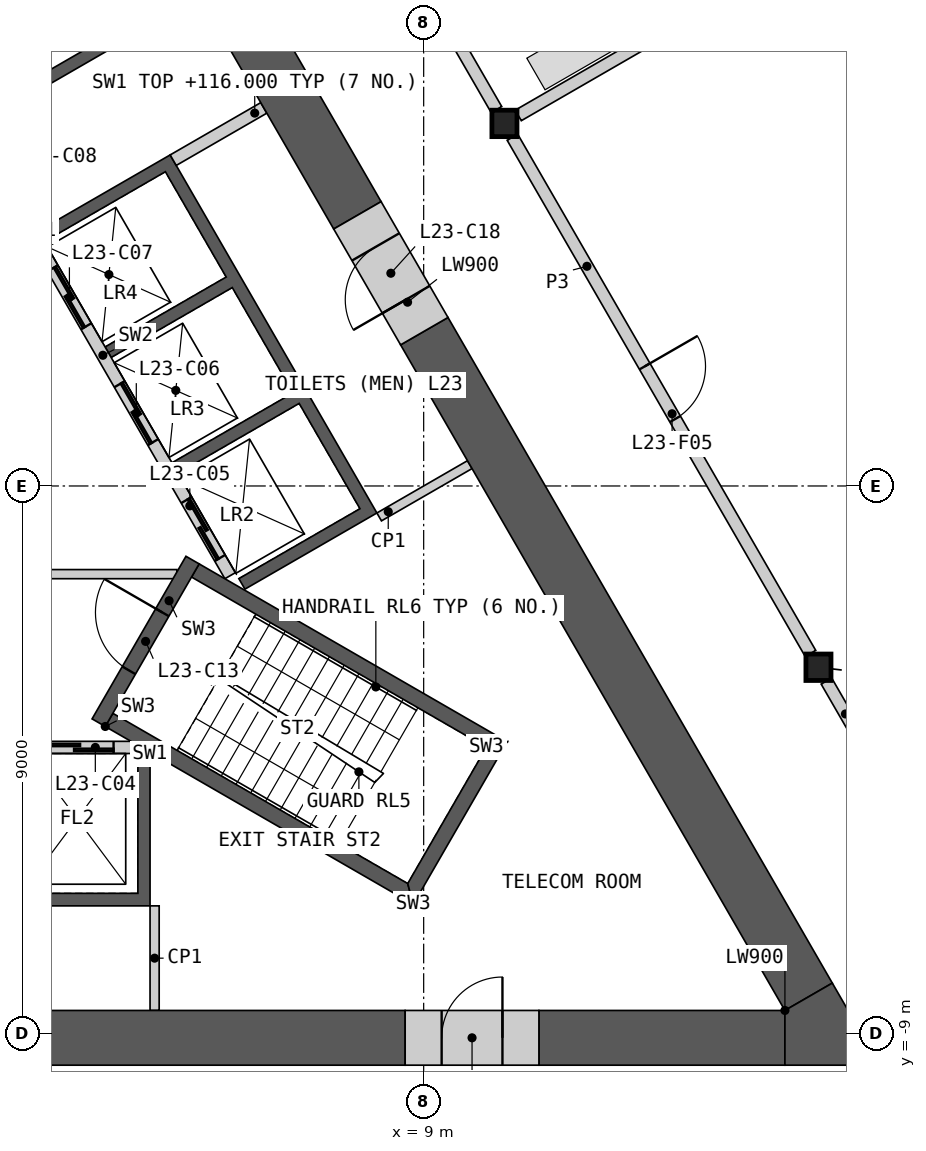
"""IFC4 building model, lengths in metres.
Left out: names, types, materials, properties, quantities, classifications, styles, units other than length and angle.
Written with IfcOpenShell. Run it as: python <this file> out.ifc"""

import sys

from ifc_helpers import new_model, si_unit, direction, frame, frame_2d, origin, origin_2d, place, context, subcontext, project, spatial, polyline, rectangle, i_section, outline, extrude, element, fill, save


model = new_model("IFC4")
c1 = context("Model", 3, precision=1e-05, world=origin(), true_north=direction((0.0, 1.0)))
c2 = subcontext(c1, "Body", "Model", "MODEL_VIEW")
j1 = project(units=[si_unit("LENGTHUNIT", "METRE"), si_unit("PLANEANGLEUNIT", "RADIAN")], contexts=[c1])
p1 = place(None, origin())
s1 = spatial("IfcSite", under=j1, at=p1, CompositionType="ELEMENT")
p2 = place(p1, origin())
s2 = spatial("IfcBuilding", under=s1, at=p2, CompositionType="ELEMENT")
p3 = place(p2, frame((0.0, 0.0, 112.2)))
s3 = spatial("IfcBuildingStorey", under=s2, at=p3, CompositionType="ELEMENT", Elevation=112.2)
for number, where, z_axis, x_axis in (
    (1, (15.493, -2.982, 0.0), (0.0, 0.0, 1.0), (1.0, 0.0, 0.0)),
    (2, (10.328, 5.963, 0.0), (0.0, 0.0, 1.0), (1.0, 0.0, 0.0)),
):
    element("IfcColumn", number, at=place(p3, frame(where, z_axis=z_axis, x_axis=x_axis)), inside=s3, PredefinedType="COLUMN", context=c2, shape_type="SweptSolid", body=[
        extrude(i_section(OverallWidth=0.412, OverallDepth=0.435, WebThickness=0.036, FlangeThickness=0.057, at=origin_2d()), origin(), (0.0, 0.0, 1.0), 4.2),
    ])
p4 = place(p3, origin())
e3 = element("IfcWall", 3, at=p4, inside=s3, PredefinedType="SHEAR", context=c2, shape_type="SweptSolid", body=[
    extrude(outline(polyline([(4.5, -4.4), (4.5, -6.906), (-4.5, -6.906), (-4.5, -4.4), (-4.3, -4.4), (-4.3, -6.7), (-2.3, -6.7), (-2.3, -4.4), (-2.1, -4.4), (-2.1, -6.7), (-0.1, -6.7), (-0.1, -4.4), (0.1, -4.4), (0.1, -6.7), (2.1, -6.7), (2.1, -4.4), (2.3, -4.4), (2.3, -6.7), (4.3, -6.7), (4.3, -4.4), (4.5, -4.4)])), origin(), (0.0, 0.0, 1.0), 3.8),
])
p5 = place(p3, frame((-4.187, -4.3, 0.0), z_axis=(0.0, 0.0, 1.0), x_axis=(1.0, 0.0, 0.0)))
e4 = element("IfcWall", 4, at=p5, inside=s3, PredefinedType="SOLIDWALL", context=c2, shape_type="SweptSolid", body=[
    extrude(rectangle(XDim=8.373, YDim=0.2, at=frame_2d((4.187, 0.0))), origin(), (0.0, 0.0, 1.0), 3.8),
])
p6 = place(p5, frame((0.287, 0.0, 0.0)))
e5 = element("IfcOpeningElement", 5, at=p6, cuts=e4, PredefinedType="OPENING", context=c2, shape_type="SweptSolid", body=[
    extrude(rectangle(XDim=1.2, YDim=2.1, at=frame_2d((0.6, 1.05))), frame((0.0, 0.11, 0.0), z_axis=(0.0, -1.0, 0.0), x_axis=(1.0, 0.0, 0.0)), (0.0, 0.0, 1.0), 0.22),
])
p7 = place(p5, frame((2.387, 0.0, 0.0)))
e6 = element("IfcOpeningElement", 6, at=p7, cuts=e4, PredefinedType="OPENING", context=c2, shape_type="SweptSolid", body=[
    extrude(rectangle(XDim=1.4, YDim=2.1, at=frame_2d((0.7, 1.05))), frame((0.0, 0.11, 0.0), z_axis=(0.0, -1.0, 0.0), x_axis=(1.0, 0.0, 0.0)), (0.0, 0.0, 1.0), 0.22),
])
p8 = place(p5, frame((4.737, 0.0, 0.0)))
e7 = element("IfcOpeningElement", 7, at=p8, cuts=e4, PredefinedType="OPENING", context=c2, shape_type="SweptSolid", body=[
    extrude(rectangle(XDim=1.1, YDim=2.1, at=frame_2d((0.55, 1.05))), frame((0.0, 0.11, 0.0), z_axis=(0.0, -1.0, 0.0), x_axis=(1.0, 0.0, 0.0)), (0.0, 0.0, 1.0), 0.22),
])
p9 = place(p5, frame((6.887, 0.0, 0.0)))
e8 = element("IfcOpeningElement", 8, at=p9, cuts=e4, PredefinedType="OPENING", context=c2, shape_type="SweptSolid", body=[
    extrude(rectangle(XDim=1.2, YDim=2.1, at=frame_2d((0.6, 1.05))), frame((0.0, 0.11, 0.0), z_axis=(0.0, -1.0, 0.0), x_axis=(1.0, 0.0, 0.0)), (0.0, 0.0, 1.0), 0.22),
])
p10 = place(p3, origin())
e9 = element("IfcWall", 9, at=p10, inside=s3, PredefinedType="SHEAR", context=c2, shape_type="SweptSolid", body=[
    extrude(outline(polyline([(1.561, 6.097), (3.731, 7.35), (3.831, 7.177), (1.66, 5.924), (1.561, 6.097)])), origin(), (0.0, 0.0, 1.0), 3.8),
])
p11 = place(p3, origin())
e10 = element("IfcWall", 10, at=p11, inside=s3, PredefinedType="SHEAR", context=c2, shape_type="SweptSolid", body=[
    extrude(outline(polyline([(2.66, 4.192), (4.831, 5.445), (8.231, -0.444), (6.061, -1.697), (5.96, -1.524), (7.952, -0.374), (6.952, 1.358), (4.96, 0.208), (4.861, 0.381), (6.852, 1.531), (5.852, 3.263), (3.861, 2.113), (3.76, 2.287), (5.752, 3.437), (4.752, 5.169), (2.76, 4.019), (2.66, 4.192)])), origin(), (0.0, 0.0, 1.0), 3.8),
])
p12 = place(p3, frame((5.817, -1.476, 0.0), z_axis=(0.0, 0.0, 1.0), x_axis=(-0.500002616675, 0.866023893041, 0.0)))
e11 = element("IfcWall", 11, at=p12, inside=s3, PredefinedType="SOLIDWALL", context=c2, shape_type="SweptSolid", body=[
    extrude(rectangle(XDim=8.373, YDim=0.2, at=frame_2d((4.187, 0.0))), origin(), (0.0, 0.0, 1.0), 3.8),
])
p13 = place(p12, frame((0.337, 0.0, 0.0)))
e12 = element("IfcOpeningElement", 12, at=p13, cuts=e11, PredefinedType="OPENING", context=c2, shape_type="SweptSolid", body=[
    extrude(rectangle(XDim=1.1, YDim=2.1, at=frame_2d((0.55, 1.05))), frame((0.0, 0.11, 0.0), z_axis=(0.0, -1.0, 0.0), x_axis=(1.0, 0.0, 0.0)), (0.0, 0.0, 1.0), 0.22),
])
p14 = place(p12, frame((2.537, 0.0, 0.0)))
e13 = element("IfcOpeningElement", 13, at=p14, cuts=e11, PredefinedType="OPENING", context=c2, shape_type="SweptSolid", body=[
    extrude(rectangle(XDim=1.1, YDim=2.1, at=frame_2d((0.55, 1.05))), frame((0.0, 0.11, 0.0), z_axis=(0.0, -1.0, 0.0), x_axis=(1.0, 0.0, 0.0)), (0.0, 0.0, 1.0), 0.22),
])
p15 = place(p12, frame((4.737, 0.0, 0.0)))
e14 = element("IfcOpeningElement", 14, at=p15, cuts=e11, PredefinedType="OPENING", context=c2, shape_type="SweptSolid", body=[
    extrude(rectangle(XDim=1.1, YDim=2.1, at=frame_2d((0.55, 1.05))), frame((0.0, 0.11, 0.0), z_axis=(0.0, -1.0, 0.0), x_axis=(1.0, 0.0, 0.0)), (0.0, 0.0, 1.0), 0.22),
])
p16 = place(p12, frame((7.037, 0.0, 0.0)))
e15 = element("IfcOpeningElement", 15, at=p16, cuts=e11, PredefinedType="OPENING", context=c2, shape_type="SweptSolid", body=[
    extrude(rectangle(XDim=0.9, YDim=2.1, at=frame_2d((0.45, 1.05))), frame((0.0, 0.11, 0.0), z_axis=(0.0, -1.0, 0.0), x_axis=(1.0, 0.0, 0.0)), (0.0, 0.0, 1.0), 0.22),
])
p17 = place(p3, frame((4.881, 5.358, 0.0), z_axis=(0.0, 0.0, 1.0), x_axis=(0.866024871741, 0.500000921525, 0.0)))
e16 = element("IfcWall", 16, at=p17, inside=s3, PredefinedType="SHEAR", context=c2, shape_type="SweptSolid", body=[
    extrude(rectangle(XDim=1.72, YDim=0.2, at=frame_2d((0.86, 0.0))), origin(), (0.0, 0.0, 1.0), 3.8),
])
p18 = place(p3, frame((-4.941, -1.45, 0.0), z_axis=(0.0, 0.0, 1.0), x_axis=(1.0, 0.0, 0.0)))
e17 = element("IfcWall", 17, at=p18, inside=s3, PredefinedType="PARTITIONING", context=c2, shape_type="SweptSolid", body=[
    extrude(rectangle(XDim=9.882, YDim=0.15, at=frame_2d((4.941, 0.0))), origin(), (0.0, 0.0, 1.0), 3.8),
])
p19 = place(p18, frame((4.391, 0.0, 0.0)))
e18 = element("IfcOpeningElement", 18, at=p19, cuts=e17, PredefinedType="OPENING", context=c2, shape_type="SweptSolid", body=[
    extrude(rectangle(XDim=1.1, YDim=2.1, at=frame_2d((0.55, 1.05))), frame((0.0, 0.085, 0.0), z_axis=(0.0, -1.0, 0.0), x_axis=(1.0, 0.0, 0.0)), (0.0, 0.0, 1.0), 0.17),
])
p20 = place(p3, origin())
e19 = element("IfcWall", 19, at=p20, inside=s3, PredefinedType="SHEAR", context=c2, shape_type="SweptSolid", body=[
    extrude(outline(polyline([(3.763, -3.956), (8.83, -6.881), (8.738, -6.539), (3.888, -3.739), (3.763, -3.956)])), origin(), (0.0, 0.0, 1.0), 3.8),
])
p21 = place(p3, origin())
e20 = element("IfcWall", 20, at=p21, inside=s3, PredefinedType="SHEAR", context=c2, shape_type="SweptSolid", body=[
    extrude(outline(polyline([(8.83, -6.881), (10.374, -4.206), (10.032, -4.298), (8.738, -6.539), (8.83, -6.881)])), origin(), (0.0, 0.0, 1.0), 3.8),
])
p22 = place(p3, origin())
e21 = element("IfcWall", 21, at=p22, inside=s3, PredefinedType="SHEAR", context=c2, shape_type="SweptSolid", body=[
    extrude(outline(polyline([(10.032, -4.298), (10.374, -4.206), (5.307, -1.281), (5.182, -1.498), (10.032, -4.298)])), origin(), (0.0, 0.0, 1.0), 3.8),
])
p23 = place(p3, frame((3.655, -3.893, 0.0), z_axis=(0.0, 0.0, 1.0), x_axis=(0.499982516597, 0.866035497597, 0.0)))
e22 = element("IfcWall", 22, at=p23, inside=s3, PredefinedType="SHEAR", context=c2, shape_type="SweptSolid", body=[
    extrude(rectangle(XDim=3.088, YDim=0.25, at=frame_2d((1.544, 0.0))), origin(), (0.0, 0.0, 1.0), 3.8),
])
p24 = place(p23, frame((0.994, 0.0, 0.0)))
e23 = element("IfcOpeningElement", 23, at=p24, cuts=e22, PredefinedType="OPENING", context=c2, shape_type="SweptSolid", body=[
    extrude(rectangle(XDim=1.1, YDim=2.1, at=frame_2d((0.55, 1.05))), frame((0.0, 0.135, 0.0), z_axis=(0.0, -1.0, 0.0), x_axis=(1.0, 0.0, 0.0)), (0.0, 0.0, 1.0), 0.27),
])
for number, where, z_axis, x_axis in (
    (24, (4.575, -6.906, 0.0), (0.0, 0.0, 1.0), (0.0, -1.0, 0.0)),
    (25, (8.268, -0.509, 0.0), (0.0, 0.0, 1.0), (0.866, 0.5, 0.0)),
):
    element("IfcWall", number, at=place(p3, frame(where, z_axis=z_axis, x_axis=x_axis)), inside=s3, PredefinedType="PARTITIONING", context=c2, shape_type="SweptSolid", body=[
        extrude(rectangle(XDim=1.72, YDim=0.15, at=frame_2d((0.86, 0.0))), origin(), (0.0, 0.0, 1.0), 3.8),
    ])
p25 = place(p3, frame((1.1, -9.076, 0.0), z_axis=(0.0, 0.0, 1.0), x_axis=(1.0, 0.0, 0.0)))
e26 = element("IfcWall", 26, at=p25, inside=s3, PredefinedType="SHEAR", context=c2, shape_type="SweptSolid", body=[
    extrude(rectangle(XDim=7.595, YDim=0.9, at=frame_2d((3.798, 0.0))), origin(), (0.0, 0.0, 1.0), 3.8),
])
p26 = place(p3, frame((10.896, -9.076, 0.0), z_axis=(0.0, 0.0, 1.0), x_axis=(1.0, 0.0, 0.0)))
e27 = element("IfcWall", 27, at=p26, inside=s3, PredefinedType="SHEAR", context=c2, shape_type="SweptSolid", body=[
    extrude(rectangle(XDim=4.046, YDim=0.9, at=frame_2d((2.023, 0.0))), origin(), (0.0, 0.0, 1.0), 3.8),
])
p27 = place(p3, frame((7.91, 4.451, 0.0), z_axis=(0.0, 0.0, 1.0), x_axis=(-0.500005799286, 0.866022055539, 0.0)))
e28 = element("IfcWall", 28, at=p27, inside=s3, PredefinedType="SHEAR", context=c2, shape_type="SweptSolid", body=[
    extrude(rectangle(XDim=15.041, YDim=0.9, at=frame_2d((7.521, 0.0))), origin(), (0.0, 0.0, 1.0), 3.8),
])
p28 = place(p3, frame((15.331, -8.401, 0.0), z_axis=(0.0, 0.0, 1.0), x_axis=(-0.49999216708, 0.866029926076, 0.0)))
e29 = element("IfcWall", 29, at=p28, inside=s3, PredefinedType="SHEAR", context=c2, shape_type="SweptSolid", body=[
    extrude(rectangle(XDim=12.641, YDim=0.9, at=frame_2d((6.321, 0.0))), origin(), (0.0, 0.0, 1.0), 3.8),
])
p29 = place(p3, origin())
e30 = element("IfcWall", 30, at=p29, inside=s3, PredefinedType="SHEAR", context=c2, shape_type="SweptSolid", body=[
    extrude(outline(polyline([(14.941, -8.626), (15.721, -8.176), (16.5, -9.526), (14.941, -9.526), (14.941, -8.626)])), origin(), (0.0, 0.0, 1.0), 3.8),
])
p30 = place(p3, frame((8.696, -9.076, 0.0), z_axis=(0.0, 0.0, 1.0), x_axis=(1.0, 0.0, 0.0)))
e31 = element("IfcWall", 31, at=p30, inside=s3, PredefinedType="SHEAR", context=c2, shape_type="SweptSolid", body=[
    extrude(rectangle(XDim=2.2, YDim=0.9, at=frame_2d((1.1, 0.0))), origin(), (0.0, 0.0, 1.0), 3.8),
])
p31 = place(p30, frame((0.6, 0.0, 0.0)))
e32 = element("IfcOpeningElement", 32, at=p31, cuts=e31, PredefinedType="OPENING", context=c2, shape_type="SweptSolid", body=[
    extrude(rectangle(XDim=1.0, YDim=2.1, at=frame_2d((0.5, 1.05))), frame((0.0, 0.46, 0.0), z_axis=(0.0, -1.0, 0.0), x_axis=(1.0, 0.0, 0.0)), (0.0, 0.0, 1.0), 0.92),
])
p32 = place(p3, frame((9.01, 2.546, 0.0), z_axis=(0.0, 0.0, 1.0), x_axis=(-0.499994660107, 0.866028486751, 0.0)))
e33 = element("IfcWall", 33, at=p32, inside=s3, PredefinedType="SHEAR", context=c2, shape_type="SweptSolid", body=[
    extrude(rectangle(XDim=2.2, YDim=0.9, at=frame_2d((1.1, 0.0))), origin(), (0.0, 0.0, 1.0), 3.8),
])
p33 = place(p32, frame((0.6, 0.0, 0.0)))
e34 = element("IfcOpeningElement", 34, at=p33, cuts=e33, PredefinedType="OPENING", context=c2, shape_type="SweptSolid", body=[
    extrude(rectangle(XDim=1.0, YDim=2.1, at=frame_2d((0.5, 1.05))), frame((0.0, 0.46, 0.0), z_axis=(0.0, -1.0, 0.0), x_axis=(1.0, 0.0, 0.0)), (0.0, 0.0, 1.0), 0.92),
])
p34 = place(p3, frame((10.46, 5.736, 0.0), z_axis=(0.0, 0.0, 1.0), x_axis=(0.500004141693, -0.866023012564, 0.0)))
e35 = element("IfcWall", 35, at=p34, inside=s3, PredefinedType="PARTITIONING", context=c2, shape_type="SweptSolid", body=[
    extrude(rectangle(XDim=9.803, YDim=0.2, at=frame_2d((4.902, 0.0))), origin(), (0.0, 0.0, 1.0), 3.8),
])
p35 = place(p34, frame((4.352, 0.0, 0.0)))
e36 = element("IfcOpeningElement", 36, at=p35, cuts=e35, PredefinedType="OPENING", context=c2, shape_type="SweptSolid", body=[
    extrude(rectangle(XDim=1.0, YDim=2.1, at=frame_2d((0.5, 1.05))), frame((0.0, 0.11, 0.0), z_axis=(0.0, -1.0, 0.0), x_axis=(1.0, 0.0, 0.0)), (0.0, 0.0, 1.0), 0.22),
])
p36 = place(p3, frame((5.295, 14.68, 0.0), z_axis=(0.0, 0.0, 1.0), x_axis=(0.500012035596, -0.866018454918, 0.0)))
e37 = element("IfcWall", 37, at=p36, inside=s3, PredefinedType="PARTITIONING", context=c2, shape_type="SweptSolid", body=[
    extrude(rectangle(XDim=9.803, YDim=0.2, at=frame_2d((4.902, 0.0))), origin(), (0.0, 0.0, 1.0), 3.8),
])
p37 = place(p36, frame((4.376, 0.0, 0.0)))
e38 = element("IfcOpeningElement", 38, at=p37, cuts=e37, PredefinedType="OPENING", context=c2, shape_type="SweptSolid", body=[
    extrude(rectangle(XDim=0.95, YDim=2.1, at=frame_2d((0.475, 1.05))), frame((0.0, 0.11, 0.0), z_axis=(0.0, -1.0, 0.0), x_axis=(1.0, 0.0, 0.0)), (0.0, 0.0, 1.0), 0.22),
])
p38 = place(p3, frame((15.624, -3.209, 0.0), z_axis=(0.0, 0.0, 1.0), x_axis=(0.499997920671, -0.866026604282, 0.0)))
e39 = element("IfcWall", 39, at=p38, inside=s3, PredefinedType="PARTITIONING", context=c2, shape_type="SweptSolid", body=[
    extrude(rectangle(XDim=6.24, YDim=0.2, at=frame_2d((3.12, 0.0))), origin(), (0.0, 0.0, 1.0), 3.8),
])
p39 = place(p3, frame((10.556, 6.094, 0.0), z_axis=(0.0, 0.0, 1.0), x_axis=(0.86602461759, 0.500001361726, 0.0)))
e40 = element("IfcWall", 40, at=p39, inside=s3, PredefinedType="PARTITIONING", context=c2, shape_type="SweptSolid", body=[
    extrude(rectangle(XDim=12.679, YDim=0.2, at=frame_2d((6.34, 0.0))), origin(), (0.0, 0.0, 1.0), 2.885),
])
p40 = place(p9, origin())
e41 = element("IfcDoor", 41, at=p40, inside=s3, OperationType="SLIDING_TO_LEFT", PredefinedType="DOOR", context=c2, shape_type="SweptSolid", body=[
    extrude(rectangle(XDim=1.2, YDim=2.1, at=frame_2d((0.6, 1.05))), frame((0.0, 0.025, 0.0), z_axis=(0.0, -1.0, 0.0), x_axis=(1.0, 0.0, 0.0)), (0.0, 0.0, 1.0), 0.05),
])
fill(e8, e41)
p41 = place(p13, origin())
e42 = element("IfcDoor", 42, at=p41, inside=s3, OperationType="SLIDING_TO_LEFT", PredefinedType="DOOR", context=c2, shape_type="SweptSolid", body=[
    extrude(rectangle(XDim=1.1, YDim=2.1, at=frame_2d((0.55, 1.05))), frame((0.0, 0.025, 0.0), z_axis=(0.0, -1.0, 0.0), x_axis=(1.0, 0.0, 0.0)), (0.0, 0.0, 1.0), 0.05),
])
fill(e12, e42)
p42 = place(p14, origin())
e43 = element("IfcDoor", 43, at=p42, inside=s3, OperationType="SLIDING_TO_LEFT", PredefinedType="DOOR", context=c2, shape_type="SweptSolid", body=[
    extrude(rectangle(XDim=1.1, YDim=2.1, at=frame_2d((0.55, 1.05))), frame((0.0, 0.025, 0.0), z_axis=(0.0, -1.0, 0.0), x_axis=(1.0, 0.0, 0.0)), (0.0, 0.0, 1.0), 0.05),
])
fill(e13, e43)
p43 = place(p15, origin())
e44 = element("IfcDoor", 44, at=p43, inside=s3, OperationType="SLIDING_TO_LEFT", PredefinedType="DOOR", context=c2, shape_type="SweptSolid", body=[
    extrude(rectangle(XDim=1.1, YDim=2.1, at=frame_2d((0.55, 1.05))), frame((0.0, 0.025, 0.0), z_axis=(0.0, -1.0, 0.0), x_axis=(1.0, 0.0, 0.0)), (0.0, 0.0, 1.0), 0.05),
])
fill(e14, e44)
p44 = place(p24, origin())
e45 = element("IfcDoor", 45, at=p44, inside=s3, OperationType="SINGLE_SWING_RIGHT", PredefinedType="DOOR", context=c2, shape_type="SweptSolid", body=[
    extrude(rectangle(XDim=1.1, YDim=2.1, at=frame_2d((0.55, 1.05))), frame((0.0, 0.025, 0.0), z_axis=(0.0, -1.0, 0.0), x_axis=(1.0, 0.0, 0.0)), (0.0, 0.0, 1.0), 0.05),
])
fill(e23, e45)
p45 = place(p31, origin())
e46 = element("IfcDoor", 46, at=p45, inside=s3, OperationType="SINGLE_SWING_RIGHT", PredefinedType="DOOR", context=c2, shape_type="SweptSolid", body=[
    extrude(rectangle(XDim=1.0, YDim=2.1, at=frame_2d((0.5, 1.05))), frame((0.0, 0.205, 0.0), z_axis=(0.0, -1.0, 0.0), x_axis=(1.0, 0.0, 0.0)), (0.0, 0.0, 1.0), 0.05),
])
fill(e32, e46)
p46 = place(p33, origin())
e47 = element("IfcDoor", 47, at=p46, inside=s3, OperationType="SINGLE_SWING_LEFT", PredefinedType="DOOR", context=c2, shape_type="SweptSolid", body=[
    extrude(rectangle(XDim=1.0, YDim=2.1, at=frame_2d((0.5, 1.05))), frame((0.0, 0.205, 0.0), z_axis=(0.0, -1.0, 0.0), x_axis=(1.0, 0.0, 0.0)), (0.0, 0.0, 1.0), 0.05),
])
fill(e34, e47)
p47 = place(p35, origin())
e48 = element("IfcDoor", 48, at=p47, inside=s3, OperationType="SINGLE_SWING_LEFT", PredefinedType="DOOR", context=c2, shape_type="SweptSolid", body=[
    extrude(rectangle(XDim=1.0, YDim=2.1, at=frame_2d((0.5, 1.05))), frame((0.0, 0.025, 0.0), z_axis=(0.0, -1.0, 0.0), x_axis=(1.0, 0.0, 0.0)), (0.0, 0.0, 1.0), 0.05),
])
fill(e36, e48)
save(model, sys.argv[1])
